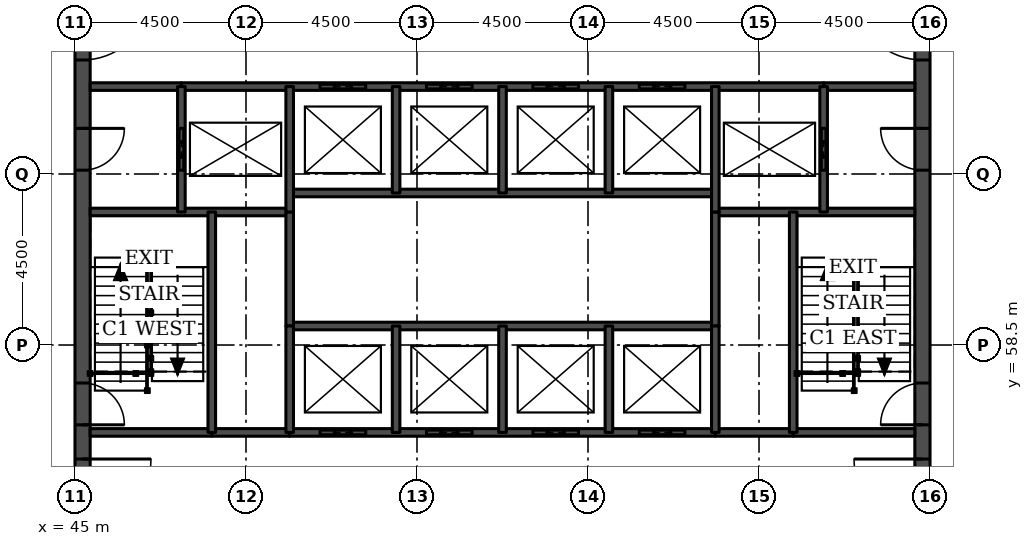
"""IFC4 building model, lengths in metres.
Left out: names, types, materials, properties, quantities, classifications, styles, units other than length and angle.
Written with IfcOpenShell. Run it as: python <this file> out.ifc"""

import sys

from ifc_helpers import new_model, si_unit, direction, frame, frame_2d, origin, place, context, subcontext, project, spatial, rectangle, extrude, element, fill, save


model = new_model("IFC4")
c1 = context("Model", 3, precision=1e-05, world=origin(), true_north=direction((0.0, 1.0)))
c2 = subcontext(c1, "Body", "Model", "MODEL_VIEW")
j1 = project(units=[si_unit("LENGTHUNIT", "METRE"), si_unit("PLANEANGLEUNIT", "RADIAN")], contexts=[c1])
p1 = place(None, origin())
s1 = spatial("IfcSite", under=j1, at=p1, CompositionType="ELEMENT")
p2 = place(p1, origin())
s2 = spatial("IfcBuilding", under=s1, at=p2, CompositionType="ELEMENT")
p3 = place(p2, frame((0.0, 0.0, 177.3)))
s3 = spatial("IfcBuildingStorey", under=s2, at=p3, CompositionType="ELEMENT", Elevation=177.3)
p4 = place(p3, frame((45.2, 49.5, 0.0), z_axis=(0.0, 0.0, 1.0), x_axis=(0.0, 1.0, 0.0)))
e1 = element("IfcWall", 1, at=p4, inside=s3, PredefinedType="SHEAR", context=c2, shape_type="SweptSolid", body=[
    extrude(rectangle(XDim=22.5, YDim=0.4, at=frame_2d((11.25, 0.0))), origin(), (0.0, 0.0, 1.0), 3.7),
])
p5 = place(p4, frame((4.2, 0.0, 0.0)))
e2 = element("IfcOpeningElement", 2, at=p5, cuts=e1, PredefinedType="OPENING", context=c2, shape_type="SweptSolid", body=[
    extrude(rectangle(XDim=1.8, YDim=2.1, at=frame_2d((0.9, 1.05))), frame((0.0, 0.21, 0.0), z_axis=(0.0, -1.0, 0.0), x_axis=(1.0, 0.0, 0.0)), (0.0, 0.0, 1.0), 0.42),
])
p6 = place(p4, frame((6.9, 0.0, 0.0)))
e3 = element("IfcOpeningElement", 3, at=p6, cuts=e1, PredefinedType="OPENING", context=c2, shape_type="SweptSolid", body=[
    extrude(rectangle(XDim=1.1, YDim=2.1, at=frame_2d((0.55, 1.05))), frame((0.0, 0.21, 0.0), z_axis=(0.0, -1.0, 0.0), x_axis=(1.0, 0.0, 0.0)), (0.0, 0.0, 1.0), 0.42),
])
p7 = place(p4, frame((13.6, 0.0, 0.0)))
e4 = element("IfcOpeningElement", 4, at=p7, cuts=e1, PredefinedType="OPENING", context=c2, shape_type="SweptSolid", body=[
    extrude(rectangle(XDim=1.1, YDim=2.1, at=frame_2d((0.55, 1.05))), frame((0.0, 0.21, 0.0), z_axis=(0.0, -1.0, 0.0), x_axis=(1.0, 0.0, 0.0)), (0.0, 0.0, 1.0), 0.42),
])
p8 = place(p4, frame((16.5, 0.0, 0.0)))
e5 = element("IfcOpeningElement", 5, at=p8, cuts=e1, PredefinedType="OPENING", context=c2, shape_type="SweptSolid", body=[
    extrude(rectangle(XDim=1.8, YDim=2.1, at=frame_2d((0.9, 1.05))), frame((0.0, 0.21, 0.0), z_axis=(0.0, -1.0, 0.0), x_axis=(1.0, 0.0, 0.0)), (0.0, 0.0, 1.0), 0.42),
])
p9 = place(p3, frame((67.3, 49.5, 0.0), z_axis=(0.0, 0.0, 1.0), x_axis=(0.0, 1.0, 0.0)))
e6 = element("IfcWall", 6, at=p9, inside=s3, PredefinedType="SHEAR", context=c2, shape_type="SweptSolid", body=[
    extrude(rectangle(XDim=22.5, YDim=0.4, at=frame_2d((11.25, 0.0))), origin(), (0.0, 0.0, 1.0), 3.7),
])
p10 = place(p9, frame((4.2, 0.0, 0.0)))
e7 = element("IfcOpeningElement", 7, at=p10, cuts=e6, PredefinedType="OPENING", context=c2, shape_type="SweptSolid", body=[
    extrude(rectangle(XDim=1.8, YDim=2.1, at=frame_2d((0.9, 1.05))), frame((0.0, 0.21, 0.0), z_axis=(0.0, -1.0, 0.0), x_axis=(1.0, 0.0, 0.0)), (0.0, 0.0, 1.0), 0.42),
])
p11 = place(p9, frame((6.9, 0.0, 0.0)))
e8 = element("IfcOpeningElement", 8, at=p11, cuts=e6, PredefinedType="OPENING", context=c2, shape_type="SweptSolid", body=[
    extrude(rectangle(XDim=1.1, YDim=2.1, at=frame_2d((0.55, 1.05))), frame((0.0, 0.21, 0.0), z_axis=(0.0, -1.0, 0.0), x_axis=(1.0, 0.0, 0.0)), (0.0, 0.0, 1.0), 0.42),
])
p12 = place(p9, frame((13.6, 0.0, 0.0)))
e9 = element("IfcOpeningElement", 9, at=p12, cuts=e6, PredefinedType="OPENING", context=c2, shape_type="SweptSolid", body=[
    extrude(rectangle(XDim=1.1, YDim=2.1, at=frame_2d((0.55, 1.05))), frame((0.0, 0.21, 0.0), z_axis=(0.0, -1.0, 0.0), x_axis=(1.0, 0.0, 0.0)), (0.0, 0.0, 1.0), 0.42),
])
p13 = place(p9, frame((16.5, 0.0, 0.0)))
e10 = element("IfcOpeningElement", 10, at=p13, cuts=e6, PredefinedType="OPENING", context=c2, shape_type="SweptSolid", body=[
    extrude(rectangle(XDim=1.8, YDim=2.1, at=frame_2d((0.9, 1.05))), frame((0.0, 0.21, 0.0), z_axis=(0.0, -1.0, 0.0), x_axis=(1.0, 0.0, 0.0)), (0.0, 0.0, 1.0), 0.42),
])
for number, where, z_axis, x_axis in (
    (11, (48.6, 56.2, 0.0), (0.0, 0.0, 1.0), (1.0, 0.0, 0.0)),
    (12, (61.85, 56.2, 0.0), (0.0, 0.0, 1.0), (1.0, 0.0, 0.0)),
):
    element("IfcWall", number, at=place(p3, frame(where, z_axis=z_axis, x_axis=x_axis)), inside=s3, PredefinedType="SOLIDWALL", context=c2, shape_type="SweptSolid", body=[
        extrude(rectangle(XDim=2.05, YDim=0.2, at=frame_2d((1.025, 0.0))), origin(), (0.0, 0.0, 1.0), 3.55),
    ])
p14 = place(p3, frame((45.4, 56.2, 0.0), z_axis=(0.0, 0.0, 1.0), x_axis=(1.0, 0.0, 0.0)))
e13 = element("IfcWall", 13, at=p14, inside=s3, PredefinedType="SOLIDWALL", context=c2, shape_type="SweptSolid", body=[
    extrude(rectangle(XDim=3.2, YDim=0.2, at=frame_2d((1.6, 0.0))), origin(), (0.0, 0.0, 1.0), 3.55),
])
p15 = place(p3, frame((50.65, 56.2, 0.0), z_axis=(0.0, 0.0, 1.0), x_axis=(1.0, 0.0, 0.0)))
e14 = element("IfcWall", 14, at=p15, inside=s3, PredefinedType="SOLIDWALL", context=c2, shape_type="SweptSolid", body=[
    extrude(rectangle(XDim=11.2, YDim=0.2, at=frame_2d((5.6, 0.0))), origin(), (0.0, 0.0, 1.0), 3.55),
])
p16 = place(p15, frame((0.8, 0.0, 0.0)))
e15 = element("IfcOpeningElement", 15, at=p16, cuts=e14, PredefinedType="OPENING", context=c2, shape_type="SweptSolid", body=[
    extrude(rectangle(XDim=1.2, YDim=2.1, at=frame_2d((0.6, 1.05))), frame((0.0, 0.11, 0.0), z_axis=(0.0, -1.0, 0.0), x_axis=(1.0, 0.0, 0.0)), (0.0, 0.0, 1.0), 0.22),
])
p17 = place(p15, frame((3.6, 0.0, 0.0)))
e16 = element("IfcOpeningElement", 16, at=p17, cuts=e14, PredefinedType="OPENING", context=c2, shape_type="SweptSolid", body=[
    extrude(rectangle(XDim=1.2, YDim=2.1, at=frame_2d((0.6, 1.05))), frame((0.0, 0.11, 0.0), z_axis=(0.0, -1.0, 0.0), x_axis=(1.0, 0.0, 0.0)), (0.0, 0.0, 1.0), 0.22),
])
p18 = place(p15, frame((6.4, 0.0, 0.0)))
e17 = element("IfcOpeningElement", 17, at=p18, cuts=e14, PredefinedType="OPENING", context=c2, shape_type="SweptSolid", body=[
    extrude(rectangle(XDim=1.2, YDim=2.1, at=frame_2d((0.6, 1.05))), frame((0.0, 0.11, 0.0), z_axis=(0.0, -1.0, 0.0), x_axis=(1.0, 0.0, 0.0)), (0.0, 0.0, 1.0), 0.22),
])
p19 = place(p15, frame((9.2, 0.0, 0.0)))
e18 = element("IfcOpeningElement", 18, at=p19, cuts=e14, PredefinedType="OPENING", context=c2, shape_type="SweptSolid", body=[
    extrude(rectangle(XDim=1.2, YDim=2.1, at=frame_2d((0.6, 1.05))), frame((0.0, 0.11, 0.0), z_axis=(0.0, -1.0, 0.0), x_axis=(1.0, 0.0, 0.0)), (0.0, 0.0, 1.0), 0.22),
])
p20 = place(p3, frame((63.9, 56.2, 0.0), z_axis=(0.0, 0.0, 1.0), x_axis=(1.0, 0.0, 0.0)))
e19 = element("IfcWall", 19, at=p20, inside=s3, PredefinedType="SOLIDWALL", context=c2, shape_type="SweptSolid", body=[
    extrude(rectangle(XDim=3.2, YDim=0.2, at=frame_2d((1.6, 0.0))), origin(), (0.0, 0.0, 1.0), 3.55),
])
p21 = place(p3, frame((50.65, 59.0, 0.0), z_axis=(0.0, 0.0, 1.0), x_axis=(1.0, 0.0, 0.0)))
e20 = element("IfcWall", 20, at=p21, inside=s3, PredefinedType="SOLIDWALL", context=c2, shape_type="SweptSolid", body=[
    extrude(rectangle(XDim=11.2, YDim=0.2, at=frame_2d((5.6, 0.0))), origin(), (0.0, 0.0, 1.0), 3.7),
])
for number, where, z_axis, x_axis in (
    (21, (45.4, 62.0, 0.0), (0.0, 0.0, 1.0), (1.0, 0.0, 0.0)),
    (22, (61.85, 62.0, 0.0), (0.0, 0.0, 1.0), (1.0, 0.0, 0.0)),
):
    element("IfcWall", number, at=place(p3, frame(where, z_axis=z_axis, x_axis=x_axis)), inside=s3, PredefinedType="SOLIDWALL", context=c2, shape_type="SweptSolid", body=[
        extrude(rectangle(XDim=5.25, YDim=0.2, at=frame_2d((2.625, 0.0))), origin(), (0.0, 0.0, 1.0), 3.55),
    ])
p22 = place(p3, frame((50.65, 62.5, 0.0), z_axis=(0.0, 0.0, 1.0), x_axis=(1.0, 0.0, 0.0)))
e23 = element("IfcWall", 23, at=p22, inside=s3, PredefinedType="SOLIDWALL", context=c2, shape_type="SweptSolid", body=[
    extrude(rectangle(XDim=11.2, YDim=0.2, at=frame_2d((5.6, 0.0))), origin(), (0.0, 0.0, 1.0), 3.7),
])
for number, where, z_axis, x_axis in (
    (24, (45.4, 65.3, 0.0), (0.0, 0.0, 1.0), (1.0, 0.0, 0.0)),
    (25, (64.7, 65.3, 0.0), (0.0, 0.0, 1.0), (1.0, 0.0, 0.0)),
):
    element("IfcWall", number, at=place(p3, frame(where, z_axis=z_axis, x_axis=x_axis)), inside=s3, PredefinedType="SOLIDWALL", context=c2, shape_type="SweptSolid", body=[
        extrude(rectangle(XDim=2.4, YDim=0.2, at=frame_2d((1.2, 0.0))), origin(), (0.0, 0.0, 1.0), 3.55),
    ])
p23 = place(p3, frame((47.8, 65.3, 0.0), z_axis=(0.0, 0.0, 1.0), x_axis=(1.0, 0.0, 0.0)))
e26 = element("IfcWall", 26, at=p23, inside=s3, PredefinedType="SOLIDWALL", context=c2, shape_type="SweptSolid", body=[
    extrude(rectangle(XDim=16.9, YDim=0.2, at=frame_2d((8.45, 0.0))), origin(), (0.0, 0.0, 1.0), 3.55),
])
p24 = place(p23, frame((3.65, 0.0, 0.0)))
e27 = element("IfcOpeningElement", 27, at=p24, cuts=e26, PredefinedType="OPENING", context=c2, shape_type="SweptSolid", body=[
    extrude(rectangle(XDim=1.2, YDim=2.1, at=frame_2d((0.6, 1.05))), frame((0.0, 0.11, 0.0), z_axis=(0.0, -1.0, 0.0), x_axis=(1.0, 0.0, 0.0)), (0.0, 0.0, 1.0), 0.22),
])
p25 = place(p23, frame((6.45, 0.0, 0.0)))
e28 = element("IfcOpeningElement", 28, at=p25, cuts=e26, PredefinedType="OPENING", context=c2, shape_type="SweptSolid", body=[
    extrude(rectangle(XDim=1.2, YDim=2.1, at=frame_2d((0.6, 1.05))), frame((0.0, 0.11, 0.0), z_axis=(0.0, -1.0, 0.0), x_axis=(1.0, 0.0, 0.0)), (0.0, 0.0, 1.0), 0.22),
])
p26 = place(p23, frame((9.25, 0.0, 0.0)))
e29 = element("IfcOpeningElement", 29, at=p26, cuts=e26, PredefinedType="OPENING", context=c2, shape_type="SweptSolid", body=[
    extrude(rectangle(XDim=1.2, YDim=2.1, at=frame_2d((0.6, 1.05))), frame((0.0, 0.11, 0.0), z_axis=(0.0, -1.0, 0.0), x_axis=(1.0, 0.0, 0.0)), (0.0, 0.0, 1.0), 0.22),
])
p27 = place(p23, frame((12.05, 0.0, 0.0)))
e30 = element("IfcOpeningElement", 30, at=p27, cuts=e26, PredefinedType="OPENING", context=c2, shape_type="SweptSolid", body=[
    extrude(rectangle(XDim=1.2, YDim=2.1, at=frame_2d((0.6, 1.05))), frame((0.0, 0.11, 0.0), z_axis=(0.0, -1.0, 0.0), x_axis=(1.0, 0.0, 0.0)), (0.0, 0.0, 1.0), 0.22),
])
p28 = place(p3, frame((47.8, 62.0, 0.0), z_axis=(0.0, 0.0, 1.0), x_axis=(0.0, 1.0, 0.0)))
e31 = element("IfcWall", 31, at=p28, inside=s3, PredefinedType="SOLIDWALL", context=c2, shape_type="SweptSolid", body=[
    extrude(rectangle(XDim=3.3, YDim=0.2, at=frame_2d((1.65, 0.0))), origin(), (0.0, 0.0, 1.0), 3.55),
])
p29 = place(p28, frame((1.1, 0.0, 0.0)))
e32 = element("IfcOpeningElement", 32, at=p29, cuts=e31, PredefinedType="OPENING", context=c2, shape_type="SweptSolid", body=[
    extrude(rectangle(XDim=1.1, YDim=2.1, at=frame_2d((0.55, 1.05))), frame((0.0, 0.11, 0.0), z_axis=(0.0, -1.0, 0.0), x_axis=(1.0, 0.0, 0.0)), (0.0, 0.0, 1.0), 0.22),
])
p30 = place(p3, frame((48.6, 56.2, 0.0), z_axis=(0.0, 0.0, 1.0), x_axis=(0.0, 1.0, 0.0)))
e33 = element("IfcWall", 33, at=p30, inside=s3, PredefinedType="SOLIDWALL", context=c2, shape_type="SweptSolid", body=[
    extrude(rectangle(XDim=5.8, YDim=0.2, at=frame_2d((2.9, 0.0))), origin(), (0.0, 0.0, 1.0), 3.55),
])
p31 = place(p3, frame((50.65, 59.0, 0.0), z_axis=(0.0, 0.0, 1.0), x_axis=(0.0, 1.0, 0.0)))
e34 = element("IfcWall", 34, at=p31, inside=s3, PredefinedType="SOLIDWALL", context=c2, shape_type="SweptSolid", body=[
    extrude(rectangle(XDim=3.0, YDim=0.2, at=frame_2d((1.5, 0.0))), origin(), (0.0, 0.0, 1.0), 3.7),
])
p32 = place(p3, frame((50.65, 56.2, 0.0), z_axis=(0.0, 0.0, 1.0), x_axis=(0.0, 1.0, 0.0)))
e35 = element("IfcWall", 35, at=p32, inside=s3, PredefinedType="SOLIDWALL", context=c2, shape_type="SweptSolid", body=[
    extrude(rectangle(XDim=2.8, YDim=0.2, at=frame_2d((1.4, 0.0))), origin(), (0.0, 0.0, 1.0), 3.55),
])
p33 = place(p3, frame((50.65, 62.0, 0.0), z_axis=(0.0, 0.0, 1.0), x_axis=(0.0, 1.0, 0.0)))
e36 = element("IfcWall", 36, at=p33, inside=s3, PredefinedType="SOLIDWALL", context=c2, shape_type="SweptSolid", body=[
    extrude(rectangle(XDim=3.3, YDim=0.2, at=frame_2d((1.65, 0.0))), origin(), (0.0, 0.0, 1.0), 3.55),
])
for number, where, z_axis, x_axis in (
    (37, (53.45, 56.2, 0.0), (0.0, 0.0, 1.0), (0.0, 1.0, 0.0)),
    (38, (53.45, 62.5, 0.0), (0.0, 0.0, 1.0), (0.0, 1.0, 0.0)),
    (39, (56.25, 56.2, 0.0), (0.0, 0.0, 1.0), (0.0, 1.0, 0.0)),
    (40, (56.25, 62.5, 0.0), (0.0, 0.0, 1.0), (0.0, 1.0, 0.0)),
    (41, (59.05, 56.2, 0.0), (0.0, 0.0, 1.0), (0.0, 1.0, 0.0)),
    (42, (59.05, 62.5, 0.0), (0.0, 0.0, 1.0), (0.0, 1.0, 0.0)),
):
    element("IfcWall", number, at=place(p3, frame(where, z_axis=z_axis, x_axis=x_axis)), inside=s3, PredefinedType="SOLIDWALL", context=c2, shape_type="SweptSolid", body=[
        extrude(rectangle(XDim=2.8, YDim=0.2, at=frame_2d((1.4, 0.0))), origin(), (0.0, 0.0, 1.0), 3.55),
    ])
p34 = place(p3, frame((61.85, 59.0, 0.0), z_axis=(0.0, 0.0, 1.0), x_axis=(0.0, 1.0, 0.0)))
e43 = element("IfcWall", 43, at=p34, inside=s3, PredefinedType="SOLIDWALL", context=c2, shape_type="SweptSolid", body=[
    extrude(rectangle(XDim=3.0, YDim=0.2, at=frame_2d((1.5, 0.0))), origin(), (0.0, 0.0, 1.0), 3.7),
])
p35 = place(p3, frame((61.85, 56.2, 0.0), z_axis=(0.0, 0.0, 1.0), x_axis=(0.0, 1.0, 0.0)))
e44 = element("IfcWall", 44, at=p35, inside=s3, PredefinedType="SOLIDWALL", context=c2, shape_type="SweptSolid", body=[
    extrude(rectangle(XDim=2.8, YDim=0.2, at=frame_2d((1.4, 0.0))), origin(), (0.0, 0.0, 1.0), 3.55),
])
p36 = place(p3, frame((61.85, 62.0, 0.0), z_axis=(0.0, 0.0, 1.0), x_axis=(0.0, 1.0, 0.0)))
e45 = element("IfcWall", 45, at=p36, inside=s3, PredefinedType="SOLIDWALL", context=c2, shape_type="SweptSolid", body=[
    extrude(rectangle(XDim=3.3, YDim=0.2, at=frame_2d((1.65, 0.0))), origin(), (0.0, 0.0, 1.0), 3.55),
])
p37 = place(p3, frame((63.9, 56.2, 0.0), z_axis=(0.0, 0.0, 1.0), x_axis=(0.0, 1.0, 0.0)))
e46 = element("IfcWall", 46, at=p37, inside=s3, PredefinedType="SOLIDWALL", context=c2, shape_type="SweptSolid", body=[
    extrude(rectangle(XDim=5.8, YDim=0.2, at=frame_2d((2.9, 0.0))), origin(), (0.0, 0.0, 1.0), 3.55),
])
p38 = place(p3, frame((64.7, 62.0, 0.0), z_axis=(0.0, 0.0, 1.0), x_axis=(0.0, 1.0, 0.0)))
e47 = element("IfcWall", 47, at=p38, inside=s3, PredefinedType="SOLIDWALL", context=c2, shape_type="SweptSolid", body=[
    extrude(rectangle(XDim=3.3, YDim=0.2, at=frame_2d((1.65, 0.0))), origin(), (0.0, 0.0, 1.0), 3.55),
])
p39 = place(p38, frame((1.1, 0.0, 0.0)))
e48 = element("IfcOpeningElement", 48, at=p39, cuts=e47, PredefinedType="OPENING", context=c2, shape_type="SweptSolid", body=[
    extrude(rectangle(XDim=1.1, YDim=2.1, at=frame_2d((0.55, 1.05))), frame((0.0, 0.11, 0.0), z_axis=(0.0, -1.0, 0.0), x_axis=(1.0, 0.0, 0.0)), (0.0, 0.0, 1.0), 0.22),
])
p40 = place(p16, origin())
e49 = element("IfcDoor", 49, at=p40, inside=s3, OperationType="DOUBLE_DOOR_SLIDING", PredefinedType="DOOR", context=c2, shape_type="SweptSolid", body=[
    extrude(rectangle(XDim=1.2, YDim=2.1, at=frame_2d((0.6, 1.05))), frame((0.0, 0.025, 0.0), z_axis=(0.0, -1.0, 0.0), x_axis=(1.0, 0.0, 0.0)), (0.0, 0.0, 1.0), 0.05),
])
fill(e15, e49)
p41 = place(p17, origin())
e50 = element("IfcDoor", 50, at=p41, inside=s3, OperationType="DOUBLE_DOOR_SLIDING", PredefinedType="DOOR", context=c2, shape_type="SweptSolid", body=[
    extrude(rectangle(XDim=1.2, YDim=2.1, at=frame_2d((0.6, 1.05))), frame((0.0, 0.025, 0.0), z_axis=(0.0, -1.0, 0.0), x_axis=(1.0, 0.0, 0.0)), (0.0, 0.0, 1.0), 0.05),
])
fill(e16, e50)
p42 = place(p18, origin())
e51 = element("IfcDoor", 51, at=p42, inside=s3, OperationType="DOUBLE_DOOR_SLIDING", PredefinedType="DOOR", context=c2, shape_type="SweptSolid", body=[
    extrude(rectangle(XDim=1.2, YDim=2.1, at=frame_2d((0.6, 1.05))), frame((0.0, 0.025, 0.0), z_axis=(0.0, -1.0, 0.0), x_axis=(1.0, 0.0, 0.0)), (0.0, 0.0, 1.0), 0.05),
])
fill(e17, e51)
p43 = place(p19, origin())
e52 = element("IfcDoor", 52, at=p43, inside=s3, OperationType="DOUBLE_DOOR_SLIDING", PredefinedType="DOOR", context=c2, shape_type="SweptSolid", body=[
    extrude(rectangle(XDim=1.2, YDim=2.1, at=frame_2d((0.6, 1.05))), frame((0.0, 0.025, 0.0), z_axis=(0.0, -1.0, 0.0), x_axis=(1.0, 0.0, 0.0)), (0.0, 0.0, 1.0), 0.05),
])
fill(e18, e52)
p44 = place(p24, origin())
e53 = element("IfcDoor", 53, at=p44, inside=s3, OperationType="DOUBLE_DOOR_SLIDING", PredefinedType="DOOR", context=c2, shape_type="SweptSolid", body=[
    extrude(rectangle(XDim=1.2, YDim=2.1, at=frame_2d((0.6, 1.05))), frame((0.0, 0.025, 0.0), z_axis=(0.0, -1.0, 0.0), x_axis=(1.0, 0.0, 0.0)), (0.0, 0.0, 1.0), 0.05),
])
fill(e27, e53)
p45 = place(p25, origin())
e54 = element("IfcDoor", 54, at=p45, inside=s3, OperationType="DOUBLE_DOOR_SLIDING", PredefinedType="DOOR", context=c2, shape_type="SweptSolid", body=[
    extrude(rectangle(XDim=1.2, YDim=2.1, at=frame_2d((0.6, 1.05))), frame((0.0, 0.025, 0.0), z_axis=(0.0, -1.0, 0.0), x_axis=(1.0, 0.0, 0.0)), (0.0, 0.0, 1.0), 0.05),
])
fill(e28, e54)
p46 = place(p26, origin())
e55 = element("IfcDoor", 55, at=p46, inside=s3, OperationType="DOUBLE_DOOR_SLIDING", PredefinedType="DOOR", context=c2, shape_type="SweptSolid", body=[
    extrude(rectangle(XDim=1.2, YDim=2.1, at=frame_2d((0.6, 1.05))), frame((0.0, 0.025, 0.0), z_axis=(0.0, -1.0, 0.0), x_axis=(1.0, 0.0, 0.0)), (0.0, 0.0, 1.0), 0.05),
])
fill(e29, e55)
p47 = place(p27, origin())
e56 = element("IfcDoor", 56, at=p47, inside=s3, OperationType="DOUBLE_DOOR_SLIDING", PredefinedType="DOOR", context=c2, shape_type="SweptSolid", body=[
    extrude(rectangle(XDim=1.2, YDim=2.1, at=frame_2d((0.6, 1.05))), frame((0.0, 0.025, 0.0), z_axis=(0.0, -1.0, 0.0), x_axis=(1.0, 0.0, 0.0)), (0.0, 0.0, 1.0), 0.05),
])
fill(e30, e56)
p48 = place(p29, origin())
e57 = element("IfcDoor", 57, at=p48, inside=s3, OperationType="DOUBLE_DOOR_SLIDING", PredefinedType="DOOR", context=c2, shape_type="SweptSolid", body=[
    extrude(rectangle(XDim=1.1, YDim=2.1, at=frame_2d((0.55, 1.05))), frame((0.0, 0.025, 0.0), z_axis=(0.0, -1.0, 0.0), x_axis=(1.0, 0.0, 0.0)), (0.0, 0.0, 1.0), 0.05),
])
fill(e32, e57)
p49 = place(p39, origin())
e58 = element("IfcDoor", 58, at=p49, inside=s3, OperationType="DOUBLE_DOOR_SLIDING", PredefinedType="DOOR", context=c2, shape_type="SweptSolid", body=[
    extrude(rectangle(XDim=1.1, YDim=2.1, at=frame_2d((0.55, 1.05))), frame((0.0, 0.025, 0.0), z_axis=(0.0, -1.0, 0.0), x_axis=(1.0, 0.0, 0.0)), (0.0, 0.0, 1.0), 0.05),
])
fill(e48, e58)
p50 = place(p5, frame((1.8, 0.0, 0.0), z_axis=(0.0, 0.0, 1.0), x_axis=(-1.0, 0.0, 0.0)))
e59 = element("IfcDoor", 59, at=p50, inside=s3, OperationType="SINGLE_SWING_LEFT", PredefinedType="DOOR", context=c2, shape_type="SweptSolid", body=[
    extrude(rectangle(XDim=1.8, YDim=2.1, at=frame_2d((0.9, 1.05))), frame((0.0, 0.025, 0.0), z_axis=(0.0, -1.0, 0.0), x_axis=(1.0, 0.0, 0.0)), (0.0, 0.0, 1.0), 0.05),
])
fill(e2, e59)
p51 = place(p6, frame((1.1, 0.0, 0.0), z_axis=(0.0, 0.0, 1.0), x_axis=(-1.0, 0.0, 0.0)))
e60 = element("IfcDoor", 60, at=p51, inside=s3, OperationType="SINGLE_SWING_RIGHT", PredefinedType="DOOR", context=c2, shape_type="SweptSolid", body=[
    extrude(rectangle(XDim=1.1, YDim=2.1, at=frame_2d((0.55, 1.05))), frame((0.0, 0.025, 0.0), z_axis=(0.0, -1.0, 0.0), x_axis=(1.0, 0.0, 0.0)), (0.0, 0.0, 1.0), 0.05),
])
fill(e3, e60)
p52 = place(p7, frame((1.1, 0.0, 0.0), z_axis=(0.0, 0.0, 1.0), x_axis=(-1.0, 0.0, 0.0)))
e61 = element("IfcDoor", 61, at=p52, inside=s3, OperationType="SINGLE_SWING_LEFT", PredefinedType="DOOR", context=c2, shape_type="SweptSolid", body=[
    extrude(rectangle(XDim=1.1, YDim=2.1, at=frame_2d((0.55, 1.05))), frame((0.0, 0.025, 0.0), z_axis=(0.0, -1.0, 0.0), x_axis=(1.0, 0.0, 0.0)), (0.0, 0.0, 1.0), 0.05),
])
fill(e4, e61)
p53 = place(p8, frame((1.8, 0.0, 0.0), z_axis=(0.0, 0.0, 1.0), x_axis=(-1.0, 0.0, 0.0)))
e62 = element("IfcDoor", 62, at=p53, inside=s3, OperationType="SINGLE_SWING_LEFT", PredefinedType="DOOR", context=c2, shape_type="SweptSolid", body=[
    extrude(rectangle(XDim=1.8, YDim=2.1, at=frame_2d((0.9, 1.05))), frame((0.0, 0.025, 0.0), z_axis=(0.0, -1.0, 0.0), x_axis=(1.0, 0.0, 0.0)), (0.0, 0.0, 1.0), 0.05),
])
fill(e5, e62)
p54 = place(p10, origin())
e63 = element("IfcDoor", 63, at=p54, inside=s3, OperationType="SINGLE_SWING_RIGHT", PredefinedType="DOOR", context=c2, shape_type="SweptSolid", body=[
    extrude(rectangle(XDim=1.8, YDim=2.1, at=frame_2d((0.9, 1.05))), frame((0.0, 0.025, 0.0), z_axis=(0.0, -1.0, 0.0), x_axis=(1.0, 0.0, 0.0)), (0.0, 0.0, 1.0), 0.05),
])
fill(e7, e63)
p55 = place(p11, origin())
e64 = element("IfcDoor", 64, at=p55, inside=s3, OperationType="SINGLE_SWING_LEFT", PredefinedType="DOOR", context=c2, shape_type="SweptSolid", body=[
    extrude(rectangle(XDim=1.1, YDim=2.1, at=frame_2d((0.55, 1.05))), frame((0.0, 0.025, 0.0), z_axis=(0.0, -1.0, 0.0), x_axis=(1.0, 0.0, 0.0)), (0.0, 0.0, 1.0), 0.05),
])
fill(e8, e64)
p56 = place(p12, origin())
e65 = element("IfcDoor", 65, at=p56, inside=s3, OperationType="SINGLE_SWING_RIGHT", PredefinedType="DOOR", context=c2, shape_type="SweptSolid", body=[
    extrude(rectangle(XDim=1.1, YDim=2.1, at=frame_2d((0.55, 1.05))), frame((0.0, 0.025, 0.0), z_axis=(0.0, -1.0, 0.0), x_axis=(1.0, 0.0, 0.0)), (0.0, 0.0, 1.0), 0.05),
])
fill(e9, e65)
p57 = place(p13, origin())
e66 = element("IfcDoor", 66, at=p57, inside=s3, OperationType="SINGLE_SWING_RIGHT", PredefinedType="DOOR", context=c2, shape_type="SweptSolid", body=[
    extrude(rectangle(XDim=1.8, YDim=2.1, at=frame_2d((0.9, 1.05))), frame((0.0, 0.025, 0.0), z_axis=(0.0, -1.0, 0.0), x_axis=(1.0, 0.0, 0.0)), (0.0, 0.0, 1.0), 0.05),
])
fill(e10, e66)
save(model, sys.argv[1])
